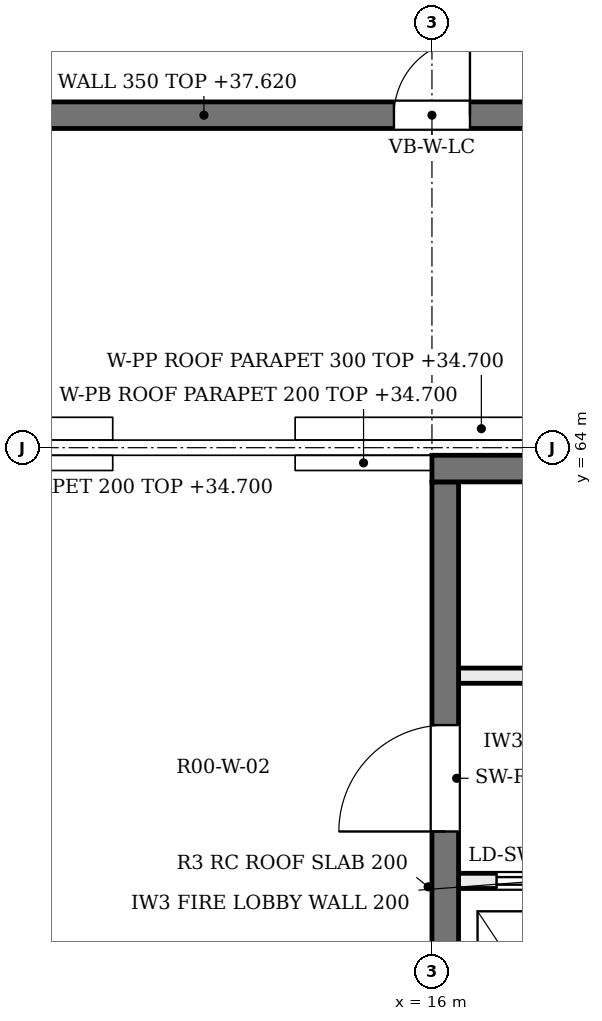
"""IFC4 building model, lengths in metres.
Left out: names, types, materials, properties, quantities, classifications, styles, units other than length and angle.
Written with IfcOpenShell. Run it as: python <this file> out.ifc"""

import sys

from ifc_helpers import new_model, si_unit, direction, frame, frame_2d, origin, place, context, subcontext, project, spatial, rectangle, extrude, element, fill, save


model = new_model("IFC4")
c1 = context("Model", 3, precision=1e-05, world=origin(), true_north=direction((0.0, 1.0)))
c2 = subcontext(c1, "Body", "Model", "MODEL_VIEW")
j1 = project(units=[si_unit("LENGTHUNIT", "METRE"), si_unit("PLANEANGLEUNIT", "RADIAN")], contexts=[c1])
p1 = place(None, origin())
s1 = spatial("IfcSite", under=j1, at=p1, CompositionType="ELEMENT")
p2 = place(p1, origin())
s2 = spatial("IfcBuilding", under=s1, at=p2, CompositionType="ELEMENT")
p3 = place(p2, frame((0.0, 0.0, 33.6)))
s3 = spatial("IfcBuildingStorey", under=s2, at=p3, CompositionType="ELEMENT", Elevation=33.6)
p4 = place(p3, frame((8.4, 68.375, 0.0), z_axis=(0.0, 0.0, 1.0), x_axis=(1.0, 0.0, 0.0)))
e1 = element("IfcWall", 1, at=p4, inside=s3, PredefinedType="SHEAR", context=c2, shape_type="SweptSolid", body=[
    extrude(rectangle(XDim=9.2, YDim=0.35, at=frame_2d((4.6, 0.0))), origin(), (0.0, 0.0, 1.0), 4.02),
])
p5 = place(p4, frame((7.1, 0.0, 0.0)))
e2 = element("IfcOpeningElement", 2, at=p5, cuts=e1, PredefinedType="OPENING", context=c2, shape_type="SweptSolid", body=[
    extrude(rectangle(XDim=1.0, YDim=2.1, at=frame_2d((0.5, 1.05))), frame((0.0, 0.185, 0.0), z_axis=(0.0, -1.0, 0.0), x_axis=(1.0, 0.0, 0.0)), (0.0, 0.0, 1.0), 0.37),
])
p6 = place(p3, frame((2.3, 64.25, 0.0), z_axis=(0.0, 0.0, 1.0), x_axis=(1.0, 0.0, 0.0)))
e3 = element("IfcWall", 3, at=p6, inside=s3, PredefinedType="PARAPET", context=c2, shape_type="SweptSolid", body=[
    extrude(rectangle(XDim=9.5, YDim=0.3, at=frame_2d((4.75, 0.0))), origin(), (0.0, 0.0, 1.0), 1.1),
])
p7 = place(p3, frame((14.2, 64.25, 0.0), z_axis=(0.0, 0.0, 1.0), x_axis=(1.0, 0.0, 0.0)))
e4 = element("IfcWall", 4, at=p7, inside=s3, PredefinedType="PARAPET", context=c2, shape_type="SweptSolid", body=[
    extrude(rectangle(XDim=3.5, YDim=0.3, at=frame_2d((1.75, 0.0))), origin(), (0.0, 0.0, 1.0), 1.1),
])
p8 = place(p3, frame((8.0, 63.8, 0.0), z_axis=(0.0, 0.0, 1.0), x_axis=(1.0, 0.0, 0.0)))
e5 = element("IfcWall", 5, at=p8, inside=s3, PredefinedType="PARAPET", context=c2, shape_type="SweptSolid", body=[
    extrude(rectangle(XDim=3.8, YDim=0.2, at=frame_2d((1.9, 0.0))), origin(), (0.0, 0.0, 1.0), 1.1),
])
p9 = place(p3, frame((14.2, 63.8, 0.0), z_axis=(0.0, 0.0, 1.0), x_axis=(1.0, 0.0, 0.0)))
e6 = element("IfcWall", 6, at=p9, inside=s3, PredefinedType="PARAPET", context=c2, shape_type="SweptSolid", body=[
    extrude(rectangle(XDim=1.8, YDim=0.2, at=frame_2d((0.9, 0.0))), origin(), (0.0, 0.0, 1.0), 1.1),
])
p10 = place(p3, frame((16.35, 58.3, 0.0), z_axis=(0.0, 0.0, 1.0), x_axis=(1.0, 0.0, 0.0)))
e7 = element("IfcWall", 7, at=p10, inside=s3, PredefinedType="SOLIDWALL", context=c2, shape_type="SweptSolid", body=[
    extrude(rectangle(XDim=7.2, YDim=0.2, at=frame_2d((3.6, 0.0))), origin(), (0.0, 0.0, 1.0), 4.5),
])
p11 = place(p10, frame((0.5, 0.0, 0.0)))
e8 = element("IfcOpeningElement", 8, at=p11, cuts=e7, PredefinedType="OPENING", context=c2, shape_type="SweptSolid", body=[
    extrude(rectangle(XDim=1.1, YDim=2.1, at=frame_2d((0.55, 1.05))), frame((0.0, 0.11, 0.0), z_axis=(0.0, -1.0, 0.0), x_axis=(1.0, 0.0, 0.0)), (0.0, 0.0, 1.0), 0.22),
])
p12 = place(p10, frame((5.6, 0.0, 0.0)))
e9 = element("IfcOpeningElement", 9, at=p12, cuts=e7, PredefinedType="OPENING", context=c2, shape_type="SweptSolid", body=[
    extrude(rectangle(XDim=1.1, YDim=2.1, at=frame_2d((0.55, 1.05))), frame((0.0, 0.11, 0.0), z_axis=(0.0, -1.0, 0.0), x_axis=(1.0, 0.0, 0.0)), (0.0, 0.0, 1.0), 0.22),
])
p13 = place(p10, frame((3.1, 0.0, 0.0)))
e10 = element("IfcOpeningElement", 10, at=p13, cuts=e7, PredefinedType="OPENING", context=c2, shape_type="SweptSolid", body=[
    extrude(rectangle(XDim=1.0, YDim=2.1, at=frame_2d((0.5, 1.05))), frame((0.0, 0.11, 0.0), z_axis=(0.0, -1.0, 0.0), x_axis=(1.0, 0.0, 0.0)), (0.0, 0.0, 1.0), 0.22),
])
p14 = place(p3, frame((16.35, 61.0, 0.0), z_axis=(0.0, 0.0, 1.0), x_axis=(1.0, 0.0, 0.0)))
e11 = element("IfcWall", 11, at=p14, inside=s3, PredefinedType="SOLIDWALL", context=c2, shape_type="SweptSolid", body=[
    extrude(rectangle(XDim=7.2, YDim=0.2, at=frame_2d((3.6, 0.0))), origin(), (0.0, 0.0, 1.0), 4.5),
])
p15 = place(p14, frame((3.1, 0.0, 0.0)))
e12 = element("IfcOpeningElement", 12, at=p15, cuts=e11, PredefinedType="OPENING", context=c2, shape_type="SweptSolid", body=[
    extrude(rectangle(XDim=1.0, YDim=2.1, at=frame_2d((0.5, 1.05))), frame((0.0, 0.11, 0.0), z_axis=(0.0, -1.0, 0.0), x_axis=(1.0, 0.0, 0.0)), (0.0, 0.0, 1.0), 0.22),
])
p16 = place(p3, frame((16.175, 48.35, 0.0), z_axis=(0.0, 0.0, 1.0), x_axis=(0.0, 1.0, 0.0)))
e13 = element("IfcWall", 13, at=p16, inside=s3, PredefinedType="SOLIDWALL", context=c2, shape_type="SweptSolid", body=[
    extrude(rectangle(XDim=15.2, YDim=0.35, at=frame_2d((7.6, 0.0))), origin(), (0.0, 0.0, 1.0), 4.5),
])
p17 = place(p16, frame((0.95, 0.0, 0.0)))
e14 = element("IfcOpeningElement", 14, at=p17, cuts=e13, PredefinedType="OPENING", context=c2, shape_type="SweptSolid", body=[
    extrude(rectangle(XDim=1.0, YDim=2.1, at=frame_2d((0.5, 1.05))), frame((0.0, 0.185, 0.0), z_axis=(0.0, -1.0, 0.0), x_axis=(1.0, 0.0, 0.0)), (0.0, 0.0, 1.0), 0.37),
])
p18 = place(p16, frame((10.6, 0.0, 0.0)))
e15 = element("IfcOpeningElement", 15, at=p18, cuts=e13, PredefinedType="OPENING", context=c2, shape_type="SweptSolid", body=[
    extrude(rectangle(XDim=1.4, YDim=2.1, at=frame_2d((0.7, 1.05))), frame((0.0, 0.185, 0.0), z_axis=(0.0, -1.0, 0.0), x_axis=(1.0, 0.0, 0.0)), (0.0, 0.0, 1.0), 0.37),
])
p19 = place(p3, frame((16.0, 63.725, 0.0), z_axis=(0.0, 0.0, 1.0), x_axis=(1.0, 0.0, 0.0)))
e16 = element("IfcWall", 16, at=p19, inside=s3, PredefinedType="SOLIDWALL", context=c2, shape_type="SweptSolid", body=[
    extrude(rectangle(XDim=7.9, YDim=0.35, at=frame_2d((3.95, 0.0))), origin(), (0.0, 0.0, 1.0), 4.5),
])
p20 = place(p11, origin())
e17 = element("IfcDoor", 17, at=p20, inside=s3, OperationType="DOUBLE_DOOR_SLIDING", PredefinedType="DOOR", context=c2, shape_type="SweptSolid", body=[
    extrude(rectangle(XDim=1.1, YDim=2.1, at=frame_2d((0.55, 1.05))), frame((0.0, 0.025, 0.0), z_axis=(0.0, -1.0, 0.0), x_axis=(1.0, 0.0, 0.0)), (0.0, 0.0, 1.0), 0.05),
])
fill(e8, e17)
p21 = place(p18, origin())
e18 = element("IfcDoor", 18, at=p21, inside=s3, OperationType="SINGLE_SWING_LEFT", PredefinedType="DOOR", context=c2, shape_type="SweptSolid", body=[
    extrude(rectangle(XDim=1.4, YDim=2.1, at=frame_2d((0.7, 1.05))), frame((0.0, 0.025, 0.0), z_axis=(0.0, -1.0, 0.0), x_axis=(1.0, 0.0, 0.0)), (0.0, 0.0, 1.0), 0.05),
])
fill(e15, e18)
p22 = place(p5, frame((1.0, 0.0, 0.0), z_axis=(0.0, 0.0, 1.0), x_axis=(-1.0, 0.0, 0.0)))
e19 = element("IfcDoor", 19, at=p22, inside=s3, OperationType="SINGLE_SWING_RIGHT", PredefinedType="DOOR", context=c2, shape_type="SweptSolid", body=[
    extrude(rectangle(XDim=1.0, YDim=2.1, at=frame_2d((0.5, 1.05))), frame((0.0, 0.025, 0.0), z_axis=(0.0, -1.0, 0.0), x_axis=(1.0, 0.0, 0.0)), (0.0, 0.0, 1.0), 0.05),
])
fill(e2, e19)
save(model, sys.argv[1])
